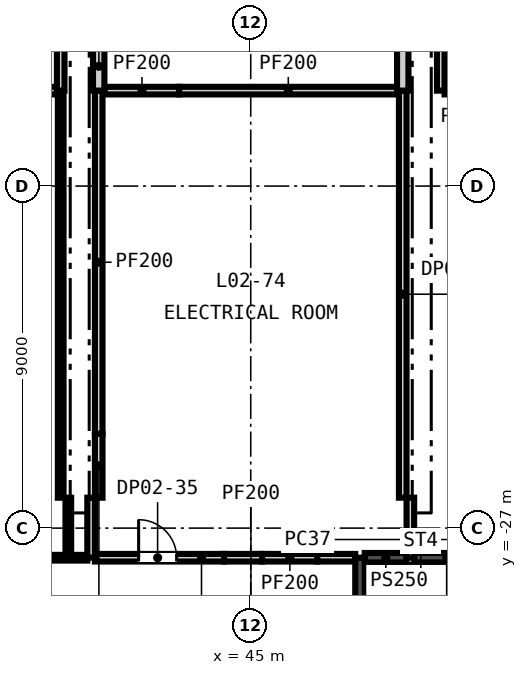
"""IFC4 building model, lengths in metres.
Left out: names, types, materials, properties, quantities, classifications, styles, units other than length and angle.
Written with IfcOpenShell. Run it as: python <this file> out.ifc"""

import sys

from ifc_helpers import new_model, si_unit, direction, frame, frame_2d, origin, place, context, subcontext, project, spatial, rectangle, extrude, element, fill, save


model = new_model("IFC4")
c1 = context("Model", 3, precision=1e-05, world=origin(), true_north=direction((0.0, 1.0)))
c2 = subcontext(c1, "Body", "Model", "MODEL_VIEW")
j1 = project(units=[si_unit("LENGTHUNIT", "METRE"), si_unit("PLANEANGLEUNIT", "RADIAN")], contexts=[c1])
p1 = place(None, origin())
s1 = spatial("IfcSite", under=j1, at=p1, CompositionType="ELEMENT")
p2 = place(p1, origin())
s2 = spatial("IfcBuilding", under=s1, at=p2, CompositionType="ELEMENT")
p3 = place(p2, frame((0.0, 0.0, 18.0)))
s3 = spatial("IfcBuildingStorey", under=s2, at=p3, CompositionType="ELEMENT", Elevation=18.0)
p4 = place(p3, frame((31.875, -27.779, 0.0), z_axis=(0.0, 0.0, 1.0), x_axis=(1.0, 0.0, 0.0)))
e1 = element("IfcWall", 1, at=p4, inside=s3, PredefinedType="PARTITIONING", context=c2, shape_type="SweptSolid", body=[
    extrude(rectangle(XDim=8.25, YDim=0.15, at=frame_2d((4.125, 0.0))), origin(), (0.0, 0.0, 1.0), 4.2),
])
p5 = place(p4, frame((3.65, 0.0, 0.0)))
e2 = element("IfcOpeningElement", 2, at=p5, cuts=e1, PredefinedType="OPENING", context=c2, shape_type="SweptSolid", body=[
    extrude(rectangle(XDim=1.0, YDim=2.1, at=frame_2d((0.5, 1.05))), frame((0.0, 0.085, 0.0), z_axis=(0.0, -1.0, 0.0), x_axis=(1.0, 0.0, 0.0)), (0.0, 0.0, 1.0), 0.17),
])
p6 = place(p3, frame((40.275, -27.779, 0.0), z_axis=(0.0, 0.0, 1.0), x_axis=(1.0, 0.0, 0.0)))
e3 = element("IfcWall", 3, at=p6, inside=s3, PredefinedType="PARTITIONING", context=c2, shape_type="SweptSolid", body=[
    extrude(rectangle(XDim=0.425, YDim=0.15, at=frame_2d((0.212, 0.0))), origin(), (0.0, 0.0, 1.0), 4.2),
])
p7 = place(p3, frame((40.9, -27.779, 0.0), z_axis=(0.0, 0.0, 1.0), x_axis=(1.0, 0.0, 0.0)))
e4 = element("IfcWall", 4, at=p7, inside=s3, PredefinedType="PARTITIONING", context=c2, shape_type="SweptSolid", body=[
    extrude(rectangle(XDim=3.4, YDim=0.2, at=frame_2d((1.7, 0.0))), origin(), (0.0, 0.0, 1.0), 4.2),
])
p8 = place(p7, frame((1.15, 0.0, 0.0)))
e5 = element("IfcOpeningElement", 5, at=p8, cuts=e4, PredefinedType="OPENING", context=c2, shape_type="SweptSolid", body=[
    extrude(rectangle(XDim=1.0, YDim=2.1, at=frame_2d((0.5, 1.05))), frame((0.0, 0.11, 0.0), z_axis=(0.0, -1.0, 0.0), x_axis=(1.0, 0.0, 0.0)), (0.0, 0.0, 1.0), 0.22),
])
p9 = place(p3, frame((44.3, -27.779, 0.0), z_axis=(0.0, 0.0, 1.0), x_axis=(1.0, 0.0, 0.0)))
e6 = element("IfcWall", 6, at=p9, inside=s3, PredefinedType="PARTITIONING", context=c2, shape_type="SweptSolid", body=[
    extrude(rectangle(XDim=1.0, YDim=0.2, at=frame_2d((0.5, 0.0))), origin(), (0.0, 0.0, 1.0), 3.597),
])
p10 = place(p3, frame((45.3, -27.779, 0.0), z_axis=(0.0, 0.0, 1.0), x_axis=(1.0, 0.0, 0.0)))
e7 = element("IfcWall", 7, at=p10, inside=s3, PredefinedType="PARTITIONING", context=c2, shape_type="SweptSolid", body=[
    extrude(rectangle(XDim=1.45, YDim=0.2, at=frame_2d((0.725, 0.0))), origin(), (0.0, 0.0, 1.0), 4.2),
])
p11 = place(p3, frame((46.75, -27.779, 0.0), z_axis=(0.0, 0.0, 1.0), x_axis=(1.0, 0.0, 0.0)))
e8 = element("IfcWall", 8, at=p11, inside=s3, PredefinedType="PARTITIONING", context=c2, shape_type="SweptSolid", body=[
    extrude(rectangle(XDim=1.0, YDim=0.2, at=frame_2d((0.5, 0.0))), origin(), (0.0, 0.0, 1.0), 3.667),
])
p12 = place(p3, frame((48.0, -27.779, 0.0), z_axis=(0.0, 0.0, 1.0), x_axis=(1.0, 0.0, 0.0)))
e9 = element("IfcWall", 9, at=p12, inside=s3, PredefinedType="SHEAR", context=c2, shape_type="SweptSolid", body=[
    extrude(rectangle(XDim=1.1, YDim=0.25, at=frame_2d((0.55, 0.0))), origin(), (0.0, 0.0, 1.0), 4.2),
])
p13 = place(p3, frame((49.3, -27.779, 0.0), z_axis=(0.0, 0.0, 1.0), x_axis=(1.0, 0.0, 0.0)))
e10 = element("IfcWall", 10, at=p13, inside=s3, PredefinedType="SHEAR", context=c2, shape_type="SweptSolid", body=[
    extrude(rectangle(XDim=1.7, YDim=0.25, at=frame_2d((0.85, 0.0))), origin(), (0.0, 0.0, 1.0), 4.2),
])
p14 = place(p3, frame((32.1, -15.489, 0.0), z_axis=(0.0, 0.0, 1.0), x_axis=(1.0, 0.0, 0.0)))
e11 = element("IfcWall", 11, at=p14, inside=s3, PredefinedType="PARTITIONING", context=c2, shape_type="SweptSolid", body=[
    extrude(rectangle(XDim=7.8, YDim=0.2, at=frame_2d((3.9, 0.0))), origin(), (0.0, 0.0, 1.0), 4.2),
])
p15 = place(p3, frame((41.15, -15.489, 0.0), z_axis=(0.0, 0.0, 1.0), x_axis=(1.0, 0.0, 0.0)))
e12 = element("IfcWall", 12, at=p15, inside=s3, PredefinedType="PARTITIONING", context=c2, shape_type="SweptSolid", body=[
    extrude(rectangle(XDim=1.967, YDim=0.2, at=frame_2d((0.983, 0.0))), origin(), (0.0, 0.0, 1.0), 3.597),
])
p16 = place(p3, frame((43.116, -15.489, 0.0), z_axis=(0.0, 0.0, 1.0), x_axis=(1.0, 0.0, 0.0)))
e13 = element("IfcWall", 13, at=p16, inside=s3, PredefinedType="PARTITIONING", context=c2, shape_type="SweptSolid", body=[
    extrude(rectangle(XDim=5.734, YDim=0.2, at=frame_2d((2.867, 0.0))), origin(), (0.0, 0.0, 1.0), 4.2),
])
p17 = place(p3, frame((50.1, -15.489, 0.0), z_axis=(0.0, 0.0, 1.0), x_axis=(1.0, 0.0, 0.0)))
e14 = element("IfcWall", 14, at=p17, inside=s3, PredefinedType="PARTITIONING", context=c2, shape_type="SweptSolid", body=[
    extrude(rectangle(XDim=1.3, YDim=0.2, at=frame_2d((0.65, 0.0))), origin(), (0.0, 0.0, 1.0), 4.2),
])
p18 = place(p3, frame((40.0, -26.2, 0.0), z_axis=(0.0, 0.0, 1.0), x_axis=(0.0, 1.0, 0.0)))
e15 = element("IfcWall", 15, at=p18, inside=s3, PredefinedType="PARTITIONING", context=c2, shape_type="SweptSolid", body=[
    extrude(rectangle(XDim=10.709, YDim=0.15, at=frame_2d((5.355, 0.0))), origin(), (0.0, 0.0, 1.0), 4.2),
])
p19 = place(p3, frame((40.0, -15.489, 0.0), z_axis=(0.0, 0.0, 1.0), x_axis=(0.0, 1.0, 0.0)))
e16 = element("IfcWall", 16, at=p19, inside=s3, PredefinedType="PARTITIONING", context=c2, shape_type="SweptSolid", body=[
    extrude(rectangle(XDim=5.688, YDim=0.2, at=frame_2d((2.844, 0.0))), origin(), (0.0, 0.0, 1.0), 4.2),
])
p20 = place(p3, frame((40.2, -27.778, 0.0), z_axis=(0.0, 0.0, 1.0), x_axis=(0.0, 1.0, 0.0)))
e17 = element("IfcWall", 17, at=p20, inside=s3, PredefinedType="PARTITIONING", context=c2, shape_type="SweptSolid", body=[
    extrude(rectangle(XDim=1.578, YDim=0.15, at=frame_2d((0.789, 0.0))), origin(), (0.0, 0.0, 1.0), 4.2),
])
p21 = place(p3, frame((40.8, -27.778, 0.0), z_axis=(0.0, 0.0, 1.0), x_axis=(0.0, 1.0, 0.0)))
e18 = element("IfcWall", 18, at=p21, inside=s3, PredefinedType="PARTITIONING", context=c2, shape_type="SweptSolid", body=[
    extrude(rectangle(XDim=1.578, YDim=0.2, at=frame_2d((0.789, 0.0))), origin(), (0.0, 0.0, 1.0), 4.2),
])
p22 = place(p3, frame((41.0, -26.2, 0.0), z_axis=(0.0, 0.0, 1.0), x_axis=(0.0, 1.0, 0.0)))
e19 = element("IfcWall", 19, at=p22, inside=s3, PredefinedType="PARTITIONING", context=c2, shape_type="SweptSolid", body=[
    extrude(rectangle(XDim=1.682, YDim=0.2, at=frame_2d((0.841, 0.0))), origin(), (0.0, 0.0, 1.0), 3.597),
])
p23 = place(p3, frame((41.0, -24.518, 0.0), z_axis=(0.0, 0.0, 1.0), x_axis=(0.0, 1.0, 0.0)))
e20 = element("IfcWall", 20, at=p23, inside=s3, PredefinedType="PARTITIONING", context=c2, shape_type="SweptSolid", body=[
    extrude(rectangle(XDim=9.028, YDim=0.2, at=frame_2d((4.514, 0.0))), origin(), (0.0, 0.0, 1.0), 4.2),
])
p24 = place(p3, frame((41.0, -15.489, 0.0), z_axis=(0.0, 0.0, 1.0), x_axis=(0.0, 1.0, 0.0)))
e21 = element("IfcWall", 21, at=p24, inside=s3, PredefinedType="PARTITIONING", context=c2, shape_type="SweptSolid", body=[
    extrude(rectangle(XDim=1.278, YDim=0.3, at=frame_2d((0.639, 0.0))), origin(), (0.0, 0.0, 1.0), 3.597),
])
p25 = place(p3, frame((47.875, -34.6, 0.0), z_axis=(0.0, 0.0, 1.0), x_axis=(0.0, 1.0, 0.0)))
e22 = element("IfcWall", 22, at=p25, inside=s3, PredefinedType="SHEAR", context=c2, shape_type="SweptSolid", body=[
    extrude(rectangle(XDim=6.821, YDim=0.25, at=frame_2d((3.411, 0.0))), origin(), (0.0, 0.0, 1.0), 4.2),
])
p26 = place(p25, frame((0.65, 0.0, 0.0)))
e23 = element("IfcOpeningElement", 23, at=p26, cuts=e22, PredefinedType="OPENING", context=c2, shape_type="SweptSolid", body=[
    extrude(rectangle(XDim=1.2, YDim=2.1, at=frame_2d((0.6, 1.05))), frame((0.0, 0.135, 0.0), z_axis=(0.0, -1.0, 0.0), x_axis=(1.0, 0.0, 0.0)), (0.0, 0.0, 1.0), 0.27),
])
p27 = place(p3, frame((49.0, -26.2, 0.0), z_axis=(0.0, 0.0, 1.0), x_axis=(0.0, 1.0, 0.0)))
e24 = element("IfcWall", 24, at=p27, inside=s3, PredefinedType="PARTITIONING", context=c2, shape_type="SweptSolid", body=[
    extrude(rectangle(XDim=10.709, YDim=0.2, at=frame_2d((5.355, 0.0))), origin(), (0.0, 0.0, 1.0), 4.2),
])
p28 = place(p3, frame((49.0, -15.489, 0.0), z_axis=(0.0, 0.0, 1.0), x_axis=(0.0, 1.0, 0.0)))
e25 = element("IfcWall", 25, at=p28, inside=s3, PredefinedType="PARTITIONING", context=c2, shape_type="SweptSolid", body=[
    extrude(rectangle(XDim=5.688, YDim=0.3, at=frame_2d((2.844, 0.0))), origin(), (0.0, 0.0, 1.0), 4.2),
])
p29 = place(p3, frame((49.2, -27.778, 0.0), z_axis=(0.0, 0.0, 1.0), x_axis=(0.0, 1.0, 0.0)))
e26 = element("IfcWall", 26, at=p29, inside=s3, PredefinedType="PARTITIONING", context=c2, shape_type="SweptSolid", body=[
    extrude(rectangle(XDim=1.578, YDim=0.2, at=frame_2d((0.789, 0.0))), origin(), (0.0, 0.0, 1.0), 4.2),
])
p30 = place(p3, frame((50.0, -15.49, 0.0), z_axis=(0.0, 0.0, 1.0), x_axis=(0.0, 1.0, 0.0)))
e27 = element("IfcWall", 27, at=p30, inside=s3, PredefinedType="PARTITIONING", context=c2, shape_type="SweptSolid", body=[
    extrude(rectangle(XDim=5.689, YDim=0.2, at=frame_2d((2.845, 0.0))), origin(), (0.0, 0.0, 1.0), 4.2),
])
p31 = place(p8, origin())
e28 = element("IfcDoor", 28, at=p31, inside=s3, OperationType="SINGLE_SWING_LEFT", PredefinedType="DOOR", context=c2, shape_type="SweptSolid", body=[
    extrude(rectangle(XDim=1.0, YDim=2.1, at=frame_2d((0.5, 1.05))), frame((0.0, 0.025, 0.0), z_axis=(0.0, -1.0, 0.0), x_axis=(1.0, 0.0, 0.0)), (0.0, 0.0, 1.0), 0.05),
])
fill(e5, e28)
save(model, sys.argv[1])
